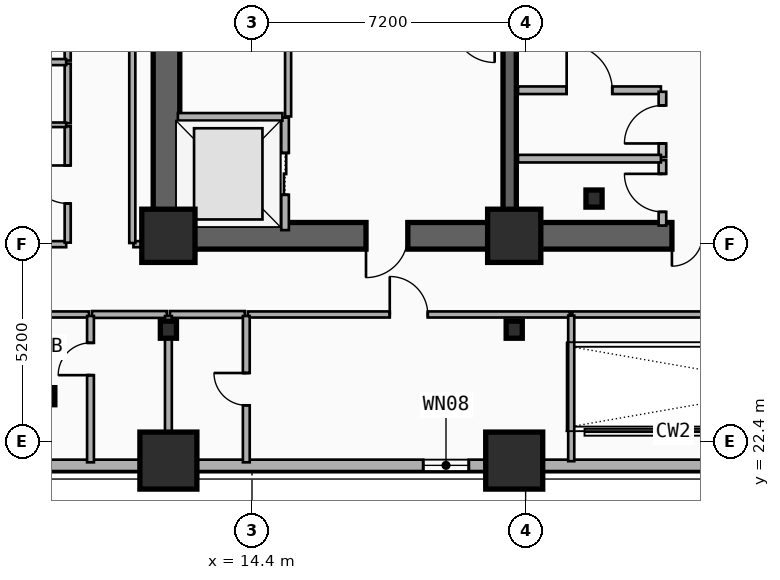
"""IFC4 building model, lengths in metres.
Left out: names, types, materials, properties, quantities, classifications, styles, units other than length and angle.
Written with IfcOpenShell. Run it as: python <this file> out.ifc"""

import sys

from ifc_helpers import new_model, si_unit, direction, frame, frame_2d, origin, origin_2d, place, context, subcontext, project, spatial, rectangle, i_section, extrude, element, fill, save


model = new_model("IFC4")
c1 = context("Model", 3, precision=1e-05, world=origin(), true_north=direction((0.0, 1.0)))
c2 = subcontext(c1, "Body", "Model", "MODEL_VIEW")
j1 = project(units=[si_unit("LENGTHUNIT", "METRE"), si_unit("PLANEANGLEUNIT", "RADIAN")], contexts=[c1])
p1 = place(None, origin())
s1 = spatial("IfcSite", under=j1, at=p1, CompositionType="ELEMENT")
p2 = place(p1, origin())
s2 = spatial("IfcBuilding", under=s1, at=p2, CompositionType="ELEMENT")
p3 = place(p2, frame((0.0, 0.0, 46.5)))
s3 = spatial("IfcBuildingStorey", under=s2, at=p3, CompositionType="ELEMENT", Elevation=46.5)
p4 = place(p3, frame((21.18, 27.82, 0.0), z_axis=(0.0, 0.0, 1.0), x_axis=(-1.0, 0.0, 0.0)))
e1 = element("IfcWall", 1, at=p4, inside=s3, PredefinedType="SHEAR", context=c2, shape_type="SweptSolid", body=[
    extrude(rectangle(XDim=9.03, YDim=0.7, at=frame_2d((4.515, 0.0))), origin(), (0.0, 0.0, 1.0), 3.5),
])
p5 = place(p4, frame((2.68, 0.0, 0.0)))
e2 = element("IfcOpeningElement", 2, at=p5, cuts=e1, PredefinedType="OPENING", context=c2, shape_type="SweptSolid", body=[
    extrude(rectangle(XDim=1.1, YDim=2.15, at=frame_2d((0.55, 1.075))), frame((0.0, 0.36, 0.0), z_axis=(0.0, -1.0, 0.0), x_axis=(1.0, 0.0, 0.0)), (0.0, 0.0, 1.0), 0.72),
])
p6 = place(p3, frame((33.15, 27.82, 0.0), z_axis=(0.0, 0.0, 1.0), x_axis=(-1.0, 0.0, 0.0)))
e3 = element("IfcWall", 3, at=p6, inside=s3, PredefinedType="SHEAR", context=c2, shape_type="SweptSolid", body=[
    extrude(rectangle(XDim=11.97, YDim=0.7, at=frame_2d((5.985, 0.0))), origin(), (0.0, 0.0, 1.0), 3.5),
])
p7 = place(p6, frame((6.1, 0.0, 0.0)))
e4 = element("IfcOpeningElement", 4, at=p7, cuts=e3, PredefinedType="OPENING", context=c2, shape_type="SweptSolid", body=[
    extrude(rectangle(XDim=1.6, YDim=2.2, at=frame_2d((0.8, 1.1))), frame((0.0, 0.36, 0.0), z_axis=(0.0, -1.0, 0.0), x_axis=(1.0, 0.0, 0.0)), (0.0, 0.0, 1.0), 0.72),
])
p8 = place(p3, frame((12.15, 28.17, 0.0), z_axis=(0.0, 0.0, 1.0), x_axis=(0.0, 1.0, 0.0)))
e5 = element("IfcWall", 5, at=p8, inside=s3, PredefinedType="SHEAR", context=c2, shape_type="SweptSolid", body=[
    extrude(rectangle(XDim=8.53, YDim=0.7, at=frame_2d((4.265, 0.0))), origin(), (0.0, 0.0, 1.0), 3.5),
])
p9 = place(p3, frame((21.18, 28.17, 0.0), z_axis=(0.0, 0.0, 1.0), x_axis=(0.0, 1.0, 0.0)))
e6 = element("IfcWall", 6, at=p9, inside=s3, PredefinedType="SHEAR", context=c2, shape_type="SweptSolid", body=[
    extrude(rectangle(XDim=8.53, YDim=0.35, at=frame_2d((4.265, 0.0))), origin(), (0.0, 0.0, 1.0), 3.5),
])
p10 = place(p3, frame((23.4, 28.8, 0.0), z_axis=(0.0, 0.0, 1.0), x_axis=(1.0, 0.0, 0.0)))
e7 = element("IfcColumn", 7, at=p10, inside=s3, PredefinedType="COLUMN", context=c2, shape_type="SweptSolid", body=[
    extrude(i_section(OverallWidth=0.424, OverallDepth=0.45, WebThickness=0.041, FlangeThickness=0.065, FilletRadius=0.015, at=origin_2d()), origin(), (0.0, 0.0, 1.0), 3.5),
])
for number, where, z_axis, x_axis in (
    (8, (12.2, 27.82, 0.0), (0.0, 0.0, 1.0), (1.0, 0.0, 0.0)),
    (9, (21.3, 27.82, 0.0), (0.0, 0.0, 1.0), (1.0, 0.0, 0.0)),
):
    element("IfcColumn", number, at=place(p3, frame(where, z_axis=z_axis, x_axis=x_axis)), inside=s3, PredefinedType="COLUMN", context=c2, shape_type="SweptSolid", body=[
        extrude(rectangle(XDim=1.4, YDim=1.4, at=origin_2d()), origin(), (0.0, 0.0, 1.0), 3.5),
    ])
for number, where, z_axis, x_axis in (
    (10, (12.2, 25.35, 0.0), (0.0, 0.0, 1.0), (1.0, 0.0, 0.0)),
    (11, (21.3, 25.35, 0.0), (0.0, 0.0, 1.0), (1.0, 0.0, 0.0)),
):
    element("IfcColumn", number, at=place(p3, frame(where, z_axis=z_axis, x_axis=x_axis)), inside=s3, PredefinedType="COLUMN", context=c2, shape_type="SweptSolid", body=[
        extrude(i_section(OverallWidth=0.424, OverallDepth=0.45, WebThickness=0.041, FlangeThickness=0.065, FilletRadius=0.015, at=origin_2d()), origin(), (0.0, 0.0, 1.0), 3.5),
    ])
for number, where, z_axis, x_axis in (
    (12, (12.2, 22.014, 0.0), (0.0, -0.09, 0.996), (1.0, 0.0, 0.0)),
    (13, (21.3, 22.014, 0.0), (0.0, -0.09, 0.996), (1.0, 0.0, 0.0)),
):
    element("IfcColumn", number, at=place(p3, frame(where, z_axis=z_axis, x_axis=x_axis)), inside=s3, PredefinedType="COLUMN", context=c2, shape_type="SweptSolid", body=[
        extrude(rectangle(XDim=1.5, YDim=1.5, at=origin_2d()), origin(), (0.0, 0.0, 1.0), 3.514),
    ])
p11 = place(p3, frame((9.0, 23.6, 0.0), z_axis=(0.0, 0.0, 1.0), x_axis=(1.0, 0.0, 0.0)))
e14 = element("IfcColumn", 14, at=p11, inside=s3, PredefinedType="COLUMN", context=c2, shape_type="SweptSolid", body=[
    extrude(i_section(OverallWidth=0.424, OverallDepth=0.45, WebThickness=0.041, FlangeThickness=0.065, FilletRadius=0.015, at=origin_2d()), origin(), (0.0, 0.0, 1.0), 3.5),
])
p12 = place(p3, frame((53.4, 21.78, 0.0), z_axis=(0.0, 0.0, 1.0), x_axis=(-1.0, 0.0, 0.0)))
e15 = element("IfcWall", 15, at=p12, inside=s3, PredefinedType="SOLIDWALL", context=c2, shape_type="SweptSolid", body=[
    extrude(rectangle(XDim=49.2, YDim=0.3, at=frame_2d((24.6, 0.0))), origin(), (0.0, 0.0, 1.0), 2.82),
])
p13 = place(p12, frame((46.896, 0.0, 0.65)))
e16 = element("IfcOpeningElement", 16, at=p13, cuts=e15, PredefinedType="OPENING", context=c2, shape_type="SweptSolid", body=[
    extrude(rectangle(XDim=1.8, YDim=1.8, at=frame_2d((0.9, 0.9))), frame((0.0, 0.16, 0.0), z_axis=(0.0, -1.0, 0.0), x_axis=(1.0, 0.0, 0.0)), (0.0, 0.0, 1.0), 0.32),
])
p14 = place(p12, frame((33.295, 0.0, 0.48)))
e17 = element("IfcOpeningElement", 17, at=p14, cuts=e15, PredefinedType="OPENING", context=c2, shape_type="SweptSolid", body=[
    extrude(rectangle(XDim=1.2, YDim=1.5, at=frame_2d((0.6, 0.75))), frame((0.0, 0.16, 0.0), z_axis=(0.0, -1.0, 0.0), x_axis=(1.0, 0.0, 0.0)), (0.0, 0.0, 1.0), 0.32),
])
p15 = place(p12, frame((9.195, 0.0, 0.34)))
e18 = element("IfcOpeningElement", 18, at=p15, cuts=e15, PredefinedType="OPENING", context=c2, shape_type="SweptSolid", body=[
    extrude(rectangle(XDim=1.2, YDim=1.5, at=frame_2d((0.6, 0.75))), frame((0.0, 0.16, 0.0), z_axis=(0.0, -1.0, 0.0), x_axis=(1.0, 0.0, 0.0)), (0.0, 0.0, 1.0), 0.32),
])
p16 = place(p12, frame((4.259, 0.0, 0.65)))
e19 = element("IfcOpeningElement", 19, at=p16, cuts=e15, PredefinedType="OPENING", context=c2, shape_type="SweptSolid", body=[
    extrude(rectangle(XDim=1.8, YDim=1.8, at=frame_2d((0.9, 0.9))), frame((0.0, 0.16, 0.0), z_axis=(0.0, -1.0, 0.0), x_axis=(1.0, 0.0, 0.0)), (0.0, 0.0, 1.0), 0.32),
])
p17 = place(p3, frame((15.27, 27.97, 0.0), z_axis=(0.0, 0.0, 1.0), x_axis=(0.0, 1.0, 0.0)))
e20 = element("IfcWall", 20, at=p17, inside=s3, PredefinedType="PARTITIONING", context=c2, shape_type="SweptSolid", body=[
    extrude(rectangle(XDim=2.96, YDim=0.2, at=frame_2d((1.48, 0.0))), origin(), (0.0, 0.0, 1.0), 2.212),
])
p18 = place(p17, frame((0.93, 0.0, 0.0)))
e21 = element("IfcOpeningElement", 21, at=p18, cuts=e20, PredefinedType="OPENING", context=c2, shape_type="SweptSolid", body=[
    extrude(rectangle(XDim=1.1, YDim=2.15, at=frame_2d((0.55, 1.075))), frame((0.0, 0.11, 0.0), z_axis=(0.0, -1.0, 0.0), x_axis=(1.0, 0.0, 0.0)), (0.0, 0.0, 1.0), 0.22),
])
p19 = place(p3, frame((12.45, 30.95, 0.0), z_axis=(0.0, 0.0, 1.0), x_axis=(1.0, 0.0, 0.0)))
e22 = element("IfcWall", 22, at=p19, inside=s3, PredefinedType="PARTITIONING", context=c2, shape_type="SweptSolid", body=[
    extrude(rectangle(XDim=2.75, YDim=0.2, at=frame_2d((1.375, 0.0))), origin(), (0.0, 0.0, 1.0), 2.212),
])
p20 = place(p3, frame((21.4, 31.65, 0.0), z_axis=(0.0, 0.0, 1.0), x_axis=(1.0, 0.0, 0.0)))
e23 = element("IfcWall", 23, at=p20, inside=s3, PredefinedType="PARTITIONING", context=c2, shape_type="SweptSolid", body=[
    extrude(rectangle(XDim=3.76, YDim=0.2, at=frame_2d((1.88, 0.0))), origin(), (0.0, 0.0, 1.0), 2.28),
])
p21 = place(p20, frame((1.28, 0.0, 0.0)))
e24 = element("IfcOpeningElement", 24, at=p21, cuts=e23, PredefinedType="OPENING", context=c2, shape_type="SweptSolid", body=[
    extrude(rectangle(XDim=1.2, YDim=2.15, at=frame_2d((0.6, 1.075))), frame((0.0, 0.11, 0.0), z_axis=(0.0, -1.0, 0.0), x_axis=(1.0, 0.0, 0.0)), (0.0, 0.0, 1.0), 0.22),
])
p22 = place(p3, frame((25.2, 28.09, 0.0), z_axis=(0.0, 0.0, 1.0), x_axis=(0.0, 1.0, 0.0)))
e25 = element("IfcWall", 25, at=p22, inside=s3, PredefinedType="PARTITIONING", context=c2, shape_type="SweptSolid", body=[
    extrude(rectangle(XDim=1.72, YDim=0.2, at=frame_2d((0.86, 0.0))), origin(), (0.0, 0.0, 1.0), 2.62),
])
p23 = place(p22, frame((0.36, 0.0, 0.0)))
e26 = element("IfcOpeningElement", 26, at=p23, cuts=e25, PredefinedType="OPENING", context=c2, shape_type="SweptSolid", body=[
    extrude(rectangle(XDim=1.0, YDim=2.15, at=frame_2d((0.5, 1.075))), frame((0.0, 0.11, 0.0), z_axis=(0.0, -1.0, 0.0), x_axis=(1.0, 0.0, 0.0)), (0.0, 0.0, 1.0), 0.22),
])
p24 = place(p3, frame((25.2, 29.89, 0.0), z_axis=(0.0, 0.0, 1.0), x_axis=(0.0, 1.0, 0.0)))
e27 = element("IfcWall", 27, at=p24, inside=s3, PredefinedType="PARTITIONING", context=c2, shape_type="SweptSolid", body=[
    extrude(rectangle(XDim=1.72, YDim=0.2, at=frame_2d((0.86, 0.0))), origin(), (0.0, 0.0, 1.0), 3.24),
])
p25 = place(p24, frame((0.36, 0.0, 0.0)))
e28 = element("IfcOpeningElement", 28, at=p25, cuts=e27, PredefinedType="OPENING", context=c2, shape_type="SweptSolid", body=[
    extrude(rectangle(XDim=1.0, YDim=2.15, at=frame_2d((0.5, 1.075))), frame((0.0, 0.11, 0.0), z_axis=(0.0, -1.0, 0.0), x_axis=(1.0, 0.0, 0.0)), (0.0, 0.0, 1.0), 0.22),
])
p26 = place(p3, frame((21.4, 29.85, 0.0), z_axis=(0.0, 0.0, 1.0), x_axis=(1.0, 0.0, 0.0)))
e29 = element("IfcWall", 29, at=p26, inside=s3, PredefinedType="PARTITIONING", context=c2, shape_type="SweptSolid", body=[
    extrude(rectangle(XDim=3.76, YDim=0.2, at=frame_2d((1.88, 0.0))), origin(), (0.0, 0.0, 1.0), 2.28),
])
p27 = place(p3, frame((0.26, 27.6, 0.0), z_axis=(0.0, 0.0, 1.0), x_axis=(1.0, 0.0, 0.0)))
e30 = element("IfcWall", 30, at=p27, inside=s3, PredefinedType="PARTITIONING", context=c2, shape_type="SweptSolid", body=[
    extrude(rectangle(XDim=9.25, YDim=0.16, at=frame_2d((4.625, 0.0))), origin(), (0.0, 0.0, 1.0), 2.57),
])
p28 = place(p27, frame((4.125, 0.0, 0.0)))
e31 = element("IfcOpeningElement", 31, at=p28, cuts=e30, PredefinedType="OPENING", context=c2, shape_type="SweptSolid", body=[
    extrude(rectangle(XDim=1.0, YDim=2.15, at=frame_2d((0.5, 1.075))), frame((0.0, 0.09, 0.0), z_axis=(0.0, -1.0, 0.0), x_axis=(1.0, 0.0, 0.0)), (0.0, 0.0, 1.0), 0.18),
])
p29 = place(p3, frame((0.26, 25.75, 0.0), z_axis=(0.0, 0.0, 1.0), x_axis=(1.0, 0.0, 0.0)))
e32 = element("IfcWall", 32, at=p29, inside=s3, PredefinedType="PARTITIONING", context=c2, shape_type="SweptSolid", body=[
    extrude(rectangle(XDim=9.85, YDim=0.16, at=frame_2d((4.925, 0.0))), origin(), (0.0, 0.0, 1.0), 2.57),
])
p30 = place(p29, frame((4.425, 0.0, 0.0)))
e33 = element("IfcOpeningElement", 33, at=p30, cuts=e32, PredefinedType="OPENING", context=c2, shape_type="SweptSolid", body=[
    extrude(rectangle(XDim=1.0, YDim=2.15, at=frame_2d((0.5, 1.075))), frame((0.0, 0.09, 0.0), z_axis=(0.0, -1.0, 0.0), x_axis=(1.0, 0.0, 0.0)), (0.0, 0.0, 1.0), 0.18),
])
p31 = place(p3, frame((10.19, 25.75, 0.0), z_axis=(0.0, 0.0, 1.0), x_axis=(1.0, 0.0, 0.0)))
e34 = element("IfcWall", 34, at=p31, inside=s3, PredefinedType="PLUMBINGWALL", context=c2, shape_type="SweptSolid", body=[
    extrude(rectangle(XDim=1.97, YDim=0.18, at=frame_2d((0.985, 0.0))), origin(), (0.0, 0.0, 1.0), 2.28),
])
p32 = place(p3, frame((14.29, 25.75, 0.0), z_axis=(0.0, 0.0, 1.0), x_axis=(1.0, 0.0, 0.0)))
e35 = element("IfcWall", 35, at=p32, inside=s3, PredefinedType="PARTITIONING", context=c2, shape_type="SweptSolid", body=[
    extrude(rectangle(XDim=8.47, YDim=0.16, at=frame_2d((4.235, 0.0))), origin(), (0.0, 0.0, 1.0), 2.28),
])
p33 = place(p32, frame((3.735, 0.0, 0.0)))
e36 = element("IfcOpeningElement", 36, at=p33, cuts=e35, PredefinedType="OPENING", context=c2, shape_type="SweptSolid", body=[
    extrude(rectangle(XDim=1.0, YDim=2.15, at=frame_2d((0.5, 1.075))), frame((0.0, 0.09, 0.0), z_axis=(0.0, -1.0, 0.0), x_axis=(1.0, 0.0, 0.0)), (0.0, 0.0, 1.0), 0.18),
])
p34 = place(p3, frame((12.24, 25.75, 0.0), z_axis=(0.0, 0.0, 1.0), x_axis=(1.0, 0.0, 0.0)))
e37 = element("IfcWall", 37, at=p34, inside=s3, PredefinedType="PLUMBINGWALL", context=c2, shape_type="SweptSolid", body=[
    extrude(rectangle(XDim=1.97, YDim=0.18, at=frame_2d((0.985, 0.0))), origin(), (0.0, 0.0, 1.0), 2.28),
])
p35 = place(p3, frame((9.55, 27.64, 0.0), z_axis=(0.0, 0.0, 1.0), x_axis=(0.0, 1.0, 0.0)))
e38 = element("IfcWall", 38, at=p35, inside=s3, PredefinedType="PARTITIONING", context=c2, shape_type="SweptSolid", body=[
    extrude(rectangle(XDim=3.061, YDim=0.16, at=frame_2d((1.531, 0.0))), origin(), (0.0, 0.0, 1.0), 3.24),
])
p36 = place(p35, frame((1.031, 0.0, 0.0)))
e39 = element("IfcOpeningElement", 39, at=p36, cuts=e38, PredefinedType="OPENING", context=c2, shape_type="SweptSolid", body=[
    extrude(rectangle(XDim=1.0, YDim=2.15, at=frame_2d((0.5, 1.075))), frame((0.0, 0.09, 0.0), z_axis=(0.0, -1.0, 0.0), x_axis=(1.0, 0.0, 0.0)), (0.0, 0.0, 1.0), 0.18),
])
p37 = place(p3, frame((9.55, 30.781, 0.0), z_axis=(0.0, 0.0, 1.0), x_axis=(0.0, 1.0, 0.0)))
e40 = element("IfcWall", 40, at=p37, inside=s3, PredefinedType="PARTITIONING", context=c2, shape_type="SweptSolid", body=[
    extrude(rectangle(XDim=1.57, YDim=0.16, at=frame_2d((0.785, 0.0))), origin(), (0.0, 0.0, 1.0), 3.24),
])
p38 = place(p3, frame((9.55, 32.431, 0.0), z_axis=(0.0, 0.0, 1.0), x_axis=(0.0, 1.0, 0.0)))
e41 = element("IfcWall", 41, at=p38, inside=s3, PredefinedType="PARTITIONING", context=c2, shape_type="SweptSolid", body=[
    extrude(rectangle(XDim=3.556, YDim=0.16, at=frame_2d((1.778, 0.0))), origin(), (0.0, 0.0, 1.0), 3.24),
])
p39 = place(p38, frame((1.278, 0.0, 0.0)))
e42 = element("IfcOpeningElement", 42, at=p39, cuts=e41, PredefinedType="OPENING", context=c2, shape_type="SweptSolid", body=[
    extrude(rectangle(XDim=1.0, YDim=2.15, at=frame_2d((0.5, 1.075))), frame((0.0, 0.09, 0.0), z_axis=(0.0, -1.0, 0.0), x_axis=(1.0, 0.0, 0.0)), (0.0, 0.0, 1.0), 0.18),
])
p40 = place(p3, frame((2.8, 30.741, 0.0), z_axis=(0.0, 0.0, 1.0), x_axis=(1.0, 0.0, 0.0)))
e43 = element("IfcWall", 43, at=p40, inside=s3, PredefinedType="PARTITIONING", context=c2, shape_type="SweptSolid", body=[
    extrude(rectangle(XDim=6.71, YDim=0.12, at=frame_2d((3.355, 0.0))), origin(), (0.0, 0.0, 1.0), 2.57),
])
p41 = place(p40, frame((2.905, 0.0, 0.0)))
e44 = element("IfcOpeningElement", 44, at=p41, cuts=e43, PredefinedType="OPENING", context=c2, shape_type="SweptSolid", body=[
    extrude(rectangle(XDim=0.9, YDim=2.1, at=frame_2d((0.45, 1.05))), frame((0.0, 0.07, 0.0), z_axis=(0.0, -1.0, 0.0), x_axis=(1.0, 0.0, 0.0)), (0.0, 0.0, 1.0), 0.14),
])
p42 = place(p3, frame((2.8, 32.391, 0.0), z_axis=(0.0, 0.0, 1.0), x_axis=(1.0, 0.0, 0.0)))
e45 = element("IfcWall", 45, at=p42, inside=s3, PredefinedType="PARTITIONING", context=c2, shape_type="SweptSolid", body=[
    extrude(rectangle(XDim=6.71, YDim=0.16, at=frame_2d((3.355, 0.0))), origin(), (0.0, 0.0, 1.0), 2.57),
])
p43 = place(p3, frame((10.15, 21.86, 0.0), z_axis=(0.0, 0.0, 1.0), x_axis=(0.0, 1.0, 0.0)))
e46 = element("IfcWall", 46, at=p43, inside=s3, PredefinedType="PLUMBINGWALL", context=c2, shape_type="SweptSolid", body=[
    extrude(rectangle(XDim=3.85, YDim=0.18, at=frame_2d((1.925, 0.0))), origin(), (0.0, 0.0, 1.0), 2.72),
])
p44 = place(p43, frame((2.293, 0.0, 0.0)))
e47 = element("IfcOpeningElement", 47, at=p44, cuts=e46, PredefinedType="OPENING", context=c2, shape_type="SweptSolid", body=[
    extrude(rectangle(XDim=0.85, YDim=2.1, at=frame_2d((0.425, 1.05))), frame((0.0, 0.1, 0.0), z_axis=(0.0, -1.0, 0.0), x_axis=(1.0, 0.0, 0.0)), (0.0, 0.0, 1.0), 0.2),
])
p45 = place(p3, frame((12.2, 21.86, 0.0), z_axis=(0.0, 0.0, 1.0), x_axis=(0.0, 1.0, 0.0)))
e48 = element("IfcWall", 48, at=p45, inside=s3, PredefinedType="PLUMBINGWALL", context=c2, shape_type="SweptSolid", body=[
    extrude(rectangle(XDim=3.85, YDim=0.18, at=frame_2d((1.925, 0.0))), origin(), (0.0, 0.0, 1.0), 2.28),
])
p46 = place(p3, frame((14.25, 21.86, 0.0), z_axis=(0.0, 0.0, 1.0), x_axis=(0.0, 1.0, 0.0)))
e49 = element("IfcWall", 49, at=p46, inside=s3, PredefinedType="PLUMBINGWALL", context=c2, shape_type="SweptSolid", body=[
    extrude(rectangle(XDim=3.85, YDim=0.18, at=frame_2d((1.925, 0.0))), origin(), (0.0, 0.0, 1.0), 2.72),
])
p47 = place(p46, frame((1.5, 0.0, 0.0)))
e50 = element("IfcOpeningElement", 50, at=p47, cuts=e49, PredefinedType="OPENING", context=c2, shape_type="SweptSolid", body=[
    extrude(rectangle(XDim=0.85, YDim=2.1, at=frame_2d((0.425, 1.05))), frame((0.0, 0.1, 0.0), z_axis=(0.0, -1.0, 0.0), x_axis=(1.0, 0.0, 0.0)), (0.0, 0.0, 1.0), 0.2),
])
p48 = place(p3, frame((15.35, 30.96, 0.0), z_axis=(0.0, 0.0, 1.0), x_axis=(0.0, 1.0, 0.0)))
e51 = element("IfcWall", 51, at=p48, inside=s3, PredefinedType="PARTITIONING", context=c2, shape_type="SweptSolid", body=[
    extrude(rectangle(XDim=2.31, YDim=0.16, at=frame_2d((1.155, 0.0))), origin(), (0.0, 0.0, 1.0), 3.24),
])
p49 = place(p3, frame((22.83, 25.75, 0.0), z_axis=(0.0, 0.0, 1.0), x_axis=(1.0, 0.0, 0.0)))
e52 = element("IfcWall", 52, at=p49, inside=s3, PredefinedType="PARTITIONING", context=c2, shape_type="SweptSolid", body=[
    extrude(rectangle(XDim=11.94, YDim=0.16, at=frame_2d((5.97, 0.0))), origin(), (0.0, 0.0, 1.0), 3.24),
])
p50 = place(p3, frame((11.28, 27.6, 0.0), z_axis=(0.0, 0.0, 1.0), x_axis=(1.0, 0.0, 0.0)))
e53 = element("IfcWall", 53, at=p50, inside=s3, PredefinedType="PARTITIONING", context=c2, shape_type="SweptSolid", body=[
    extrude(rectangle(XDim=0.84, YDim=0.16, at=frame_2d((0.42, 0.0))), origin(), (0.0, 0.0, 1.0), 2.28),
])
p51 = place(p3, frame((11.25, 27.63, 0.0), z_axis=(0.0, 0.0, 1.0), x_axis=(0.0, 1.0, 0.0)))
e54 = element("IfcWall", 54, at=p51, inside=s3, PredefinedType="PARTITIONING", context=c2, shape_type="SweptSolid", body=[
    extrude(rectangle(XDim=10.24, YDim=0.16, at=frame_2d((5.12, 0.0))), origin(), (0.0, 0.0, 1.0), 2.72),
])
p52 = place(p3, frame((22.8, 21.89, 0.0), z_axis=(0.0, 0.0, 1.0), x_axis=(0.0, 1.0, 0.0)))
e55 = element("IfcWall", 55, at=p52, inside=s3, PredefinedType="PARTITIONING", context=c2, shape_type="SweptSolid", body=[
    extrude(rectangle(XDim=3.83, YDim=0.16, at=frame_2d((1.915, 0.0))), origin(), (0.0, 0.0, 1.0), 2.82),
])
p53 = place(p14, origin())
e56 = element("IfcWindow", 56, at=p53, inside=s3, PartitioningType="SINGLE_PANEL", PredefinedType="WINDOW", context=c2, shape_type="SweptSolid", body=[
    extrude(rectangle(XDim=1.2, YDim=1.5, at=frame_2d((0.6, 0.75))), frame((0.0, 0.03, 0.0), z_axis=(0.0, -1.0, 0.0), x_axis=(1.0, 0.0, 0.0)), (0.0, 0.0, 1.0), 0.06),
])
fill(e17, e56)
p54 = place(p18, origin())
e57 = element("IfcDoor", 57, at=p54, inside=s3, OperationType="DOUBLE_DOOR_SLIDING", PredefinedType="DOOR", context=c2, shape_type="SweptSolid", body=[
    extrude(rectangle(XDim=1.1, YDim=2.15, at=frame_2d((0.55, 1.075))), frame((0.0, 0.025, 0.0), z_axis=(0.0, -1.0, 0.0), x_axis=(1.0, 0.0, 0.0)), (0.0, 0.0, 1.0), 0.05),
])
fill(e21, e57)
p55 = place(p5, origin())
e58 = element("IfcDoor", 58, at=p55, inside=s3, OperationType="SINGLE_SWING_RIGHT", PredefinedType="DOOR", context=c2, shape_type="SweptSolid", body=[
    extrude(rectangle(XDim=1.1, YDim=2.15, at=frame_2d((0.55, 1.075))), frame((0.0, 0.025, 0.0), z_axis=(0.0, -1.0, 0.0), x_axis=(1.0, 0.0, 0.0)), (0.0, 0.0, 1.0), 0.05),
])
fill(e2, e58)
p56 = place(p7, origin())
e59 = element("IfcDoor", 59, at=p56, inside=s3, OperationType="SINGLE_SWING_LEFT", PredefinedType="DOOR", context=c2, shape_type="SweptSolid", body=[
    extrude(rectangle(XDim=1.6, YDim=2.2, at=frame_2d((0.8, 1.1))), frame((0.0, 0.025, 0.0), z_axis=(0.0, -1.0, 0.0), x_axis=(1.0, 0.0, 0.0)), (0.0, 0.0, 1.0), 0.05),
])
fill(e4, e59)
p57 = place(p21, origin())
e60 = element("IfcDoor", 60, at=p57, inside=s3, OperationType="SINGLE_SWING_LEFT", PredefinedType="DOOR", context=c2, shape_type="SweptSolid", body=[
    extrude(rectangle(XDim=1.2, YDim=2.15, at=frame_2d((0.6, 1.075))), frame((0.0, 0.025, 0.0), z_axis=(0.0, -1.0, 0.0), x_axis=(1.0, 0.0, 0.0)), (0.0, 0.0, 1.0), 0.05),
])
fill(e24, e60)
p58 = place(p23, origin())
e61 = element("IfcDoor", 61, at=p58, inside=s3, OperationType="SINGLE_SWING_RIGHT", PredefinedType="DOOR", context=c2, shape_type="SweptSolid", body=[
    extrude(rectangle(XDim=1.0, YDim=2.15, at=frame_2d((0.5, 1.075))), frame((0.0, 0.025, 0.0), z_axis=(0.0, -1.0, 0.0), x_axis=(1.0, 0.0, 0.0)), (0.0, 0.0, 1.0), 0.05),
])
fill(e26, e61)
p59 = place(p25, origin())
e62 = element("IfcDoor", 62, at=p59, inside=s3, OperationType="SINGLE_SWING_LEFT", PredefinedType="DOOR", context=c2, shape_type="SweptSolid", body=[
    extrude(rectangle(XDim=1.0, YDim=2.15, at=frame_2d((0.5, 1.075))), frame((0.0, 0.025, 0.0), z_axis=(0.0, -1.0, 0.0), x_axis=(1.0, 0.0, 0.0)), (0.0, 0.0, 1.0), 0.05),
])
fill(e28, e62)
p60 = place(p33, origin())
e63 = element("IfcDoor", 63, at=p60, inside=s3, OperationType="SINGLE_SWING_LEFT", PredefinedType="DOOR", context=c2, shape_type="SweptSolid", body=[
    extrude(rectangle(XDim=1.0, YDim=2.15, at=frame_2d((0.5, 1.075))), frame((0.0, 0.025, 0.0), z_axis=(0.0, -1.0, 0.0), x_axis=(1.0, 0.0, 0.0)), (0.0, 0.0, 1.0), 0.05),
])
fill(e36, e63)
p61 = place(p36, origin())
e64 = element("IfcDoor", 64, at=p61, inside=s3, OperationType="SINGLE_SWING_RIGHT", PredefinedType="DOOR", context=c2, shape_type="SweptSolid", body=[
    extrude(rectangle(XDim=1.0, YDim=2.15, at=frame_2d((0.5, 1.075))), frame((0.0, 0.025, 0.0), z_axis=(0.0, -1.0, 0.0), x_axis=(1.0, 0.0, 0.0)), (0.0, 0.0, 1.0), 0.05),
])
fill(e39, e64)
p62 = place(p44, origin())
e65 = element("IfcDoor", 65, at=p62, inside=s3, OperationType="SINGLE_SWING_LEFT", PredefinedType="DOOR", context=c2, shape_type="SweptSolid", body=[
    extrude(rectangle(XDim=0.85, YDim=2.1, at=frame_2d((0.425, 1.05))), frame((0.0, 0.025, 0.0), z_axis=(0.0, -1.0, 0.0), x_axis=(1.0, 0.0, 0.0)), (0.0, 0.0, 1.0), 0.05),
])
fill(e47, e65)
p63 = place(p47, origin())
e66 = element("IfcDoor", 66, at=p63, inside=s3, OperationType="SINGLE_SWING_RIGHT", PredefinedType="DOOR", context=c2, shape_type="SweptSolid", body=[
    extrude(rectangle(XDim=0.85, YDim=2.1, at=frame_2d((0.425, 1.05))), frame((0.0, 0.025, 0.0), z_axis=(0.0, -1.0, 0.0), x_axis=(1.0, 0.0, 0.0)), (0.0, 0.0, 1.0), 0.05),
])
fill(e50, e66)
save(model, sys.argv[1])
